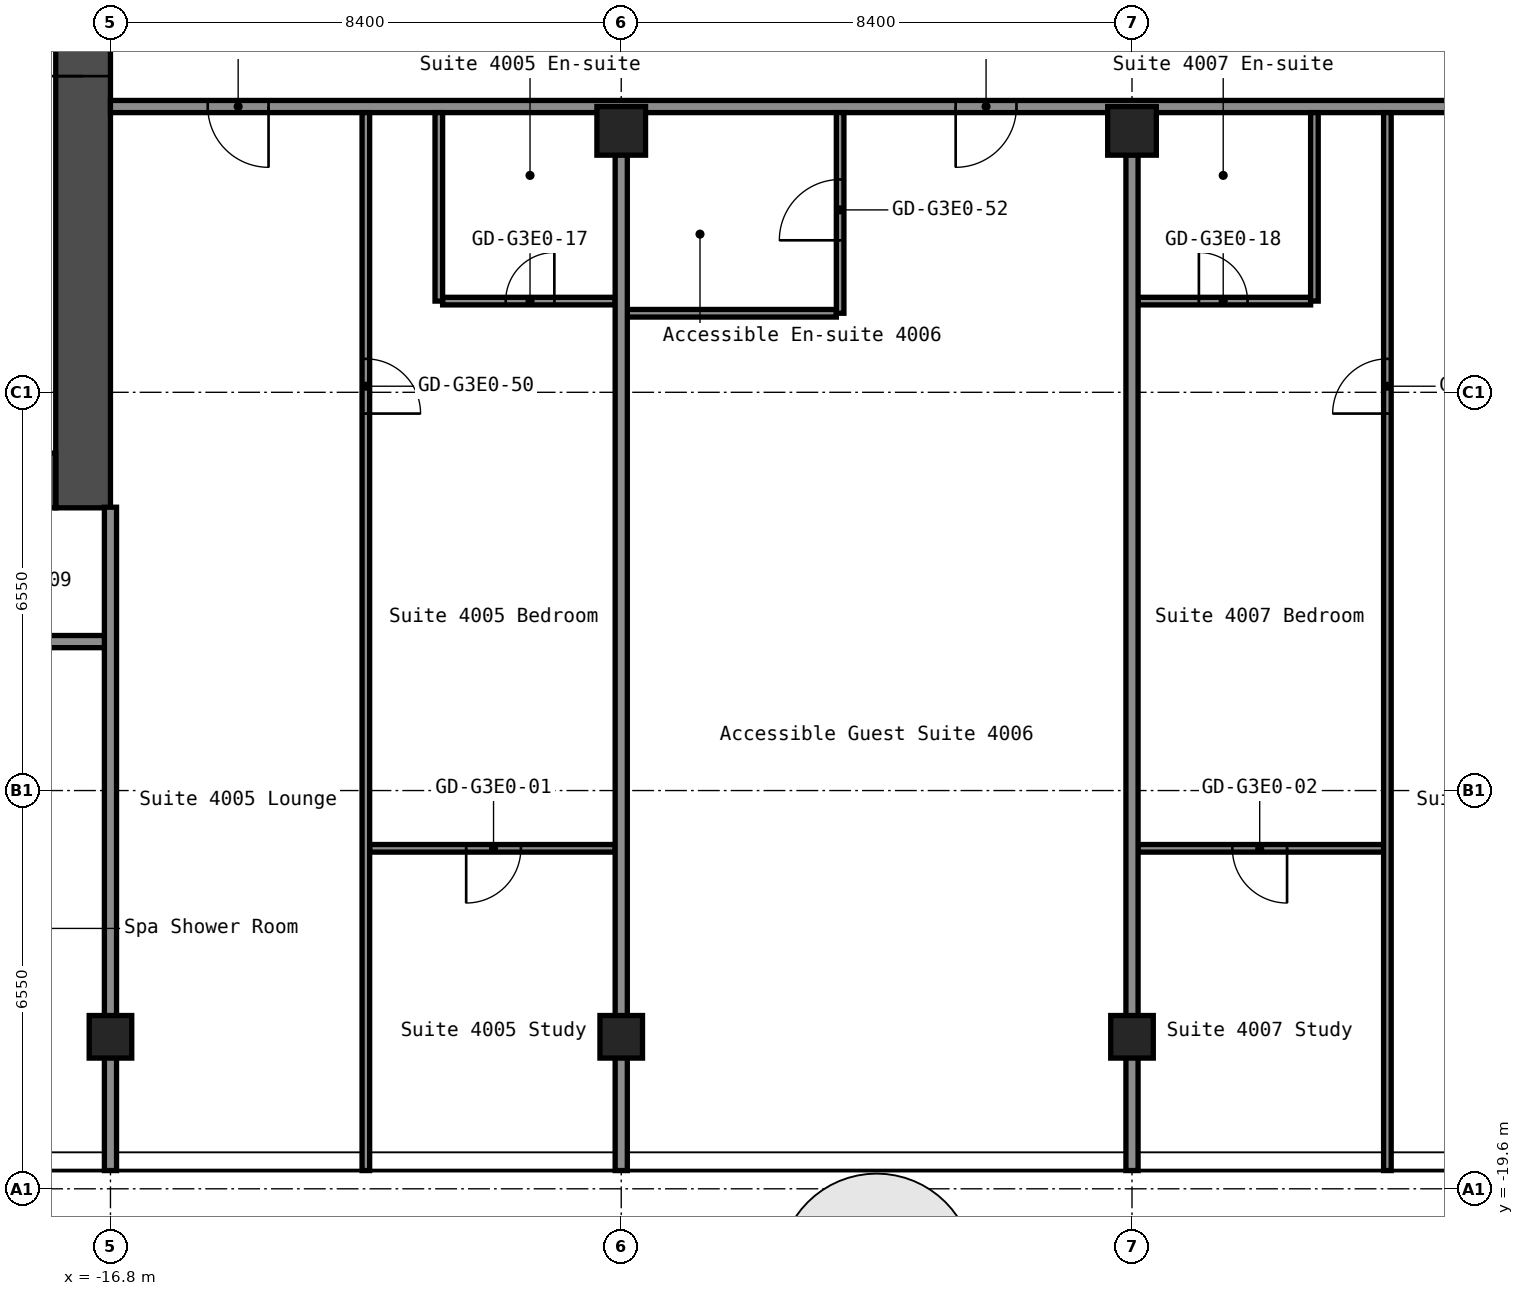
"""IFC4 building model, lengths in metres.
Left out: names, types, materials, properties, quantities, classifications, styles, units other than length and angle.
Written with IfcOpenShell. Run it as: python <this file> out.ifc"""

import sys

from ifc_helpers import new_model, si_unit, direction, frame, frame_2d, origin, origin_2d, place, context, subcontext, project, spatial, rectangle, hollow_rectangle, extrude, element, fill, save


model = new_model("IFC4")
c1 = context("Model", 3, precision=1e-05, world=origin(), true_north=direction((0.0, 1.0)))
c2 = subcontext(c1, "Body", "Model", "MODEL_VIEW")
j1 = project(units=[si_unit("LENGTHUNIT", "METRE"), si_unit("PLANEANGLEUNIT", "RADIAN")], contexts=[c1])
p1 = place(None, origin())
s1 = spatial("IfcSite", under=j1, at=p1, CompositionType="ELEMENT")
p2 = place(p1, origin())
s2 = spatial("IfcBuilding", under=s1, at=p2, CompositionType="ELEMENT")
p3 = place(p2, frame((0.0, 0.0, 143.8)))
s3 = spatial("IfcBuildingStorey", under=s2, at=p3, CompositionType="ELEMENT", Elevation=143.8)
for number, where, z_axis, x_axis in (
    (1, (-16.8, -17.1, 0.0), (0.0, 0.0, 1.0), (1.0, 0.0, 0.0)),
    (2, (-8.4, -17.1, 0.0), (0.0, 0.0, 1.0), (1.0, 0.0, 0.0)),
):
    element("IfcColumn", number, at=place(p3, frame(where, z_axis=z_axis, x_axis=x_axis)), inside=s3, PredefinedType="COLUMN", context=c2, shape_type="SweptSolid", body=[
        extrude(hollow_rectangle(XDim=0.7, YDim=0.7, WallThickness=0.028, at=origin_2d()), origin(), (0.0, 0.0, 1.0), 2.75),
    ])
p4 = place(p3, frame((-8.4, -2.2, 0.0), z_axis=(0.0, 0.0, 1.0), x_axis=(1.0, 0.0, 0.0)))
e3 = element("IfcColumn", 3, at=p4, inside=s3, PredefinedType="COLUMN", context=c2, shape_type="SweptSolid", body=[
    extrude(hollow_rectangle(XDim=0.8, YDim=0.8, WallThickness=0.032, at=origin_2d()), origin(), (0.0, 0.0, 1.0), 2.75),
])
p5 = place(p3, frame((0.0, -17.1, 0.0), z_axis=(0.0, 0.0, 1.0), x_axis=(1.0, 0.0, 0.0)))
e4 = element("IfcColumn", 4, at=p5, inside=s3, PredefinedType="COLUMN", context=c2, shape_type="SweptSolid", body=[
    extrude(hollow_rectangle(XDim=0.7, YDim=0.7, WallThickness=0.028, at=origin_2d()), origin(), (0.0, 0.0, 1.0), 2.75),
])
p6 = place(p3, frame((0.0, -2.2, 0.0), z_axis=(0.0, 0.0, 1.0), x_axis=(1.0, 0.0, 0.0)))
e5 = element("IfcColumn", 5, at=p6, inside=s3, PredefinedType="COLUMN", context=c2, shape_type="SweptSolid", body=[
    extrude(hollow_rectangle(XDim=0.8, YDim=0.8, WallThickness=0.032, at=origin_2d()), origin(), (0.0, 0.0, 1.0), 2.75),
])
p7 = place(p3, frame((-17.25, -8.4, 0.0), z_axis=(0.0, 0.0, 1.0), x_axis=(0.0, 1.0, 0.0)))
e6 = element("IfcWall", 6, at=p7, inside=s3, PredefinedType="SHEAR", context=c2, shape_type="SweptSolid", body=[
    extrude(rectangle(XDim=16.8, YDim=0.9, at=frame_2d((8.4, 0.0))), origin(), (0.0, 0.0, 1.0), 2.75),
])
p8 = place(p7, frame((7.1, 0.0, 0.0)))
e7 = element("IfcOpeningElement", 7, at=p8, cuts=e6, PredefinedType="OPENING", context=c2, shape_type="SweptSolid", body=[
    extrude(rectangle(XDim=1.6, YDim=2.1, at=frame_2d((0.8, 1.05))), frame((0.0, 0.46, 0.0), z_axis=(0.0, -1.0, 0.0), x_axis=(1.0, 0.0, 0.0)), (0.0, 0.0, 1.0), 0.92),
])
p9 = place(p3, frame((-32.7, -7.95, 0.0), z_axis=(0.0, 0.0, 1.0), x_axis=(1.0, 0.0, 0.0)))
e8 = element("IfcWall", 8, at=p9, inside=s3, PredefinedType="SHEAR", context=c2, shape_type="SweptSolid", body=[
    extrude(rectangle(XDim=15.0, YDim=0.9, at=frame_2d((7.5, 0.0))), origin(), (0.0, 0.0, 1.0), 2.75),
])
p10 = place(p9, frame((11.45, 0.0, 0.0)))
e9 = element("IfcOpeningElement", 9, at=p10, cuts=e8, PredefinedType="OPENING", context=c2, shape_type="SweptSolid", body=[
    extrude(rectangle(XDim=1.0, YDim=2.1, at=frame_2d((0.5, 1.05))), frame((0.0, 0.46, 0.0), z_axis=(0.0, -1.0, 0.0), x_axis=(1.0, 0.0, 0.0)), (0.0, 0.0, 1.0), 0.92),
])
p11 = place(p3, frame((-12.538, -14.0, 0.0), z_axis=(0.0, 0.0, 1.0), x_axis=(1.0, 0.0, 0.0)))
e10 = element("IfcWall", 10, at=p11, inside=s3, PredefinedType="PARTITIONING", context=c2, shape_type="SweptSolid", body=[
    extrude(rectangle(XDim=4.038, YDim=0.125, at=frame_2d((2.019, 0.0))), origin(), (0.0, 0.0, 1.0), 2.75),
])
p12 = place(p11, frame((1.587, 0.0, 0.0)))
e11 = element("IfcOpeningElement", 11, at=p12, cuts=e10, PredefinedType="OPENING", context=c2, shape_type="SweptSolid", body=[
    extrude(rectangle(XDim=0.9, YDim=2.1, at=frame_2d((0.45, 1.05))), frame((0.0, 0.073, 0.0), z_axis=(0.0, -1.0, 0.0), x_axis=(1.0, 0.0, 0.0)), (0.0, 0.0, 1.0), 0.145),
])
p13 = place(p3, frame((0.1, -14.0, 0.0), z_axis=(0.0, 0.0, 1.0), x_axis=(1.0, 0.0, 0.0)))
e12 = element("IfcWall", 12, at=p13, inside=s3, PredefinedType="PARTITIONING", context=c2, shape_type="SweptSolid", body=[
    extrude(rectangle(XDim=4.037, YDim=0.125, at=frame_2d((2.019, 0.0))), origin(), (0.0, 0.0, 1.0), 2.75),
])
p14 = place(p13, frame((1.55, 0.0, 0.0)))
e13 = element("IfcOpeningElement", 13, at=p14, cuts=e12, PredefinedType="OPENING", context=c2, shape_type="SweptSolid", body=[
    extrude(rectangle(XDim=0.9, YDim=2.1, at=frame_2d((0.45, 1.05))), frame((0.0, 0.073, 0.0), z_axis=(0.0, -1.0, 0.0), x_axis=(1.0, 0.0, 0.0)), (0.0, 0.0, 1.0), 0.145),
])
p15 = place(p3, frame((-42.7, -10.6, 0.0), z_axis=(0.0, 0.0, 1.0), x_axis=(1.0, 0.0, 0.0)))
e14 = element("IfcWall", 14, at=p15, inside=s3, PredefinedType="PARTITIONING", context=c2, shape_type="SweptSolid", body=[
    extrude(rectangle(XDim=25.9, YDim=0.2, at=frame_2d((12.95, 0.0))), origin(), (0.0, 0.0, 1.0), 2.75),
])
p16 = place(p15, frame((2.225, 0.0, 0.0)))
e15 = element("IfcOpeningElement", 15, at=p16, cuts=e14, PredefinedType="OPENING", context=c2, shape_type="SweptSolid", body=[
    extrude(rectangle(XDim=0.9, YDim=2.1, at=frame_2d((0.45, 1.05))), frame((0.0, 0.11, 0.0), z_axis=(0.0, -1.0, 0.0), x_axis=(1.0, 0.0, 0.0)), (0.0, 0.0, 1.0), 0.22),
])
p17 = place(p15, frame((6.625, 0.0, 0.0)))
e16 = element("IfcOpeningElement", 16, at=p17, cuts=e14, PredefinedType="OPENING", context=c2, shape_type="SweptSolid", body=[
    extrude(rectangle(XDim=0.9, YDim=2.1, at=frame_2d((0.45, 1.05))), frame((0.0, 0.11, 0.0), z_axis=(0.0, -1.0, 0.0), x_axis=(1.0, 0.0, 0.0)), (0.0, 0.0, 1.0), 0.22),
])
p18 = place(p15, frame((11.0, 0.0, 0.0)))
e17 = element("IfcOpeningElement", 17, at=p18, cuts=e14, PredefinedType="OPENING", context=c2, shape_type="SweptSolid", body=[
    extrude(rectangle(XDim=0.9, YDim=2.1, at=frame_2d((0.45, 1.05))), frame((0.0, 0.11, 0.0), z_axis=(0.0, -1.0, 0.0), x_axis=(1.0, 0.0, 0.0)), (0.0, 0.0, 1.0), 0.22),
])
p19 = place(p15, frame((15.2, 0.0, 0.0)))
e18 = element("IfcOpeningElement", 18, at=p19, cuts=e14, PredefinedType="OPENING", context=c2, shape_type="SweptSolid", body=[
    extrude(rectangle(XDim=0.9, YDim=2.1, at=frame_2d((0.45, 1.05))), frame((0.0, 0.11, 0.0), z_axis=(0.0, -1.0, 0.0), x_axis=(1.0, 0.0, 0.0)), (0.0, 0.0, 1.0), 0.22),
])
p20 = place(p15, frame((19.655, 0.0, 0.0)))
e19 = element("IfcOpeningElement", 19, at=p20, cuts=e14, PredefinedType="OPENING", context=c2, shape_type="SweptSolid", body=[
    extrude(rectangle(XDim=0.9, YDim=2.1, at=frame_2d((0.45, 1.05))), frame((0.0, 0.11, 0.0), z_axis=(0.0, -1.0, 0.0), x_axis=(1.0, 0.0, 0.0)), (0.0, 0.0, 1.0), 0.22),
])
p21 = place(p15, frame((23.855, 0.0, 0.0)))
e20 = element("IfcOpeningElement", 20, at=p21, cuts=e14, PredefinedType="OPENING", context=c2, shape_type="SweptSolid", body=[
    extrude(rectangle(XDim=0.9, YDim=2.1, at=frame_2d((0.45, 1.05))), frame((0.0, 0.11, 0.0), z_axis=(0.0, -1.0, 0.0), x_axis=(1.0, 0.0, 0.0)), (0.0, 0.0, 1.0), 0.22),
])
p22 = place(p3, frame((-8.3, -5.2, 0.0), z_axis=(0.0, 0.0, 1.0), x_axis=(1.0, 0.0, 0.0)))
e21 = element("IfcWall", 21, at=p22, inside=s3, PredefinedType="PARTITIONING", context=c2, shape_type="SweptSolid", body=[
    extrude(rectangle(XDim=3.438, YDim=0.125, at=frame_2d((1.719, 0.0))), origin(), (0.0, 0.0, 1.0), 2.75),
])
p23 = place(p3, frame((-11.337, -5.0, 0.0), z_axis=(0.0, 0.0, 1.0), x_axis=(1.0, 0.0, 0.0)))
e22 = element("IfcWall", 22, at=p23, inside=s3, PredefinedType="PARTITIONING", context=c2, shape_type="SweptSolid", body=[
    extrude(rectangle(XDim=2.837, YDim=0.125, at=frame_2d((1.419, 0.0))), origin(), (0.0, 0.0, 1.0), 2.75),
])
p24 = place(p23, frame((1.038, 0.0, 0.0)))
e23 = element("IfcOpeningElement", 23, at=p24, cuts=e22, PredefinedType="OPENING", context=c2, shape_type="SweptSolid", body=[
    extrude(rectangle(XDim=0.8, YDim=2.1, at=frame_2d((0.4, 1.05))), frame((0.0, 0.073, 0.0), z_axis=(0.0, -1.0, 0.0), x_axis=(1.0, 0.0, 0.0)), (0.0, 0.0, 1.0), 0.145),
])
p25 = place(p3, frame((0.1, -5.0, 0.0), z_axis=(0.0, 0.0, 1.0), x_axis=(1.0, 0.0, 0.0)))
e24 = element("IfcWall", 24, at=p25, inside=s3, PredefinedType="PARTITIONING", context=c2, shape_type="SweptSolid", body=[
    extrude(rectangle(XDim=2.837, YDim=0.125, at=frame_2d((1.419, 0.0))), origin(), (0.0, 0.0, 1.0), 2.75),
])
p26 = place(p25, frame((1.0, 0.0, 0.0)))
e25 = element("IfcOpeningElement", 25, at=p26, cuts=e24, PredefinedType="OPENING", context=c2, shape_type="SweptSolid", body=[
    extrude(rectangle(XDim=0.8, YDim=2.1, at=frame_2d((0.4, 1.05))), frame((0.0, 0.073, 0.0), z_axis=(0.0, -1.0, 0.0), x_axis=(1.0, 0.0, 0.0)), (0.0, 0.0, 1.0), 0.145),
])
p27 = place(p3, frame((-16.8, -1.8, 0.0), z_axis=(0.0, 0.0, 1.0), x_axis=(1.0, 0.0, 0.0)))
e26 = element("IfcWall", 26, at=p27, inside=s3, PredefinedType="PARTITIONING", context=c2, shape_type="SweptSolid", body=[
    extrude(rectangle(XDim=33.6, YDim=0.2, at=frame_2d((16.8, 0.0))), origin(), (0.0, 0.0, 1.0), 2.75),
])
p28 = place(p27, frame((1.6, 0.0, 0.0)))
e27 = element("IfcOpeningElement", 27, at=p28, cuts=e26, PredefinedType="OPENING", context=c2, shape_type="SweptSolid", body=[
    extrude(rectangle(XDim=1.0, YDim=2.1, at=frame_2d((0.5, 1.05))), frame((0.0, 0.11, 0.0), z_axis=(0.0, -1.0, 0.0), x_axis=(1.0, 0.0, 0.0)), (0.0, 0.0, 1.0), 0.22),
])
p29 = place(p27, frame((13.9, 0.0, 0.0)))
e28 = element("IfcOpeningElement", 28, at=p29, cuts=e26, PredefinedType="OPENING", context=c2, shape_type="SweptSolid", body=[
    extrude(rectangle(XDim=1.0, YDim=2.1, at=frame_2d((0.5, 1.05))), frame((0.0, 0.11, 0.0), z_axis=(0.0, -1.0, 0.0), x_axis=(1.0, 0.0, 0.0)), (0.0, 0.0, 1.0), 0.22),
])
p30 = place(p27, frame((22.6, 0.0, 0.0)))
e29 = element("IfcOpeningElement", 29, at=p30, cuts=e26, PredefinedType="OPENING", context=c2, shape_type="SweptSolid", body=[
    extrude(rectangle(XDim=1.0, YDim=2.1, at=frame_2d((0.5, 1.05))), frame((0.0, 0.11, 0.0), z_axis=(0.0, -1.0, 0.0), x_axis=(1.0, 0.0, 0.0)), (0.0, 0.0, 1.0), 0.22),
])
p31 = place(p27, frame((26.8, 0.0, 0.0)))
e30 = element("IfcOpeningElement", 30, at=p31, cuts=e26, PredefinedType="OPENING", context=c2, shape_type="SweptSolid", body=[
    extrude(rectangle(XDim=1.0, YDim=2.1, at=frame_2d((0.5, 1.05))), frame((0.0, 0.11, 0.0), z_axis=(0.0, -1.0, 0.0), x_axis=(1.0, 0.0, 0.0)), (0.0, 0.0, 1.0), 0.22),
])
p32 = place(p3, frame((-16.8, -19.3, 0.0), z_axis=(0.0, 0.0, 1.0), x_axis=(0.0, 1.0, 0.0)))
e31 = element("IfcWall", 31, at=p32, inside=s3, PredefinedType="PARTITIONING", context=c2, shape_type="SweptSolid", body=[
    extrude(rectangle(XDim=10.91, YDim=0.2, at=frame_2d((5.455, 0.0))), origin(), (0.0, 0.0, 1.0), 2.75),
])
p33 = place(p3, frame((-12.6, -19.3, 0.0), z_axis=(0.0, 0.0, 1.0), x_axis=(0.0, 1.0, 0.0)))
e32 = element("IfcWall", 32, at=p33, inside=s3, PredefinedType="PARTITIONING", context=c2, shape_type="SweptSolid", body=[
    extrude(rectangle(XDim=17.4, YDim=0.125, at=frame_2d((8.7, 0.0))), origin(), (0.0, 0.0, 1.0), 2.75),
])
p34 = place(p33, frame((12.45, 0.0, 0.0)))
e33 = element("IfcOpeningElement", 33, at=p34, cuts=e32, PredefinedType="OPENING", context=c2, shape_type="SweptSolid", body=[
    extrude(rectangle(XDim=0.9, YDim=2.1, at=frame_2d((0.45, 1.05))), frame((0.0, 0.073, 0.0), z_axis=(0.0, -1.0, 0.0), x_axis=(1.0, 0.0, 0.0)), (0.0, 0.0, 1.0), 0.145),
])
p35 = place(p3, frame((-11.4, -5.0, 0.0), z_axis=(0.0, 0.0, 1.0), x_axis=(0.0, 1.0, 0.0)))
e34 = element("IfcWall", 34, at=p35, inside=s3, PredefinedType="PARTITIONING", context=c2, shape_type="SweptSolid", body=[
    extrude(rectangle(XDim=3.1, YDim=0.125, at=frame_2d((1.55, 0.0))), origin(), (0.0, 0.0, 1.0), 2.75),
])
p36 = place(p3, frame((-8.4, -19.3, 0.0), z_axis=(0.0, 0.0, 1.0), x_axis=(0.0, 1.0, 0.0)))
e35 = element("IfcWall", 35, at=p36, inside=s3, PredefinedType="PARTITIONING", context=c2, shape_type="SweptSolid", body=[
    extrude(rectangle(XDim=16.71, YDim=0.2, at=frame_2d((8.355, 0.0))), origin(), (0.0, 0.0, 1.0), 2.75),
])
p37 = place(p3, frame((-4.8, -5.2, 0.0), z_axis=(0.0, 0.0, 1.0), x_axis=(0.0, 1.0, 0.0)))
e36 = element("IfcWall", 36, at=p37, inside=s3, PredefinedType="PARTITIONING", context=c2, shape_type="SweptSolid", body=[
    extrude(rectangle(XDim=3.3, YDim=0.125, at=frame_2d((1.65, 0.0))), origin(), (0.0, 0.0, 1.0), 2.75),
])
p38 = place(p37, frame((1.2, 0.0, 0.0)))
e37 = element("IfcOpeningElement", 37, at=p38, cuts=e36, PredefinedType="OPENING", context=c2, shape_type="SweptSolid", body=[
    extrude(rectangle(XDim=1.0, YDim=2.1, at=frame_2d((0.5, 1.05))), frame((0.0, 0.073, 0.0), z_axis=(0.0, -1.0, 0.0), x_axis=(1.0, 0.0, 0.0)), (0.0, 0.0, 1.0), 0.145),
])
p39 = place(p3, frame((0.0, -19.3, 0.0), z_axis=(0.0, 0.0, 1.0), x_axis=(0.0, 1.0, 0.0)))
e38 = element("IfcWall", 38, at=p39, inside=s3, PredefinedType="PARTITIONING", context=c2, shape_type="SweptSolid", body=[
    extrude(rectangle(XDim=16.71, YDim=0.2, at=frame_2d((8.355, 0.0))), origin(), (0.0, 0.0, 1.0), 2.75),
])
p40 = place(p3, frame((3.0, -5.0, 0.0), z_axis=(0.0, 0.0, 1.0), x_axis=(0.0, 1.0, 0.0)))
e39 = element("IfcWall", 39, at=p40, inside=s3, PredefinedType="PARTITIONING", context=c2, shape_type="SweptSolid", body=[
    extrude(rectangle(XDim=3.1, YDim=0.125, at=frame_2d((1.55, 0.0))), origin(), (0.0, 0.0, 1.0), 2.75),
])
p41 = place(p3, frame((4.2, -19.3, 0.0), z_axis=(0.0, 0.0, 1.0), x_axis=(0.0, 1.0, 0.0)))
e40 = element("IfcWall", 40, at=p41, inside=s3, PredefinedType="PARTITIONING", context=c2, shape_type="SweptSolid", body=[
    extrude(rectangle(XDim=17.4, YDim=0.125, at=frame_2d((8.7, 0.0))), origin(), (0.0, 0.0, 1.0), 2.75),
])
p42 = place(p41, frame((12.45, 0.0, 0.0)))
e41 = element("IfcOpeningElement", 41, at=p42, cuts=e40, PredefinedType="OPENING", context=c2, shape_type="SweptSolid", body=[
    extrude(rectangle(XDim=0.9, YDim=2.1, at=frame_2d((0.45, 1.05))), frame((0.0, 0.073, 0.0), z_axis=(0.0, -1.0, 0.0), x_axis=(1.0, 0.0, 0.0)), (0.0, 0.0, 1.0), 0.145),
])
p43 = place(p8, origin())
e42 = element("IfcDoor", 42, at=p43, inside=s3, OperationType="DOUBLE_DOOR_SINGLE_SWING", PredefinedType="DOOR", context=c2, shape_type="SweptSolid", body=[
    extrude(rectangle(XDim=1.6, YDim=2.1, at=frame_2d((0.8, 1.05))), frame((0.0, 0.025, 0.0), z_axis=(0.0, -1.0, 0.0), x_axis=(1.0, 0.0, 0.0)), (0.0, 0.0, 1.0), 0.05),
])
fill(e7, e42)
p44 = place(p12, origin())
e43 = element("IfcDoor", 43, at=p44, inside=s3, OperationType="SINGLE_SWING_LEFT", PredefinedType="DOOR", context=c2, shape_type="SweptSolid", body=[
    extrude(rectangle(XDim=0.9, YDim=2.1, at=frame_2d((0.45, 1.05))), frame((0.0, 0.025, 0.0), z_axis=(0.0, -1.0, 0.0), x_axis=(1.0, 0.0, 0.0)), (0.0, 0.0, 1.0), 0.05),
])
fill(e11, e43)
p45 = place(p14, origin())
e44 = element("IfcDoor", 44, at=p45, inside=s3, OperationType="SINGLE_SWING_RIGHT", PredefinedType="DOOR", context=c2, shape_type="SweptSolid", body=[
    extrude(rectangle(XDim=0.9, YDim=2.1, at=frame_2d((0.45, 1.05))), frame((0.0, 0.025, 0.0), z_axis=(0.0, -1.0, 0.0), x_axis=(1.0, 0.0, 0.0)), (0.0, 0.0, 1.0), 0.05),
])
fill(e13, e44)
p46 = place(p24, origin())
e45 = element("IfcDoor", 45, at=p46, inside=s3, OperationType="SINGLE_SWING_LEFT", PredefinedType="DOOR", context=c2, shape_type="SweptSolid", body=[
    extrude(rectangle(XDim=0.8, YDim=2.1, at=frame_2d((0.4, 1.05))), frame((0.0, 0.025, 0.0), z_axis=(0.0, -1.0, 0.0), x_axis=(1.0, 0.0, 0.0)), (0.0, 0.0, 1.0), 0.05),
])
fill(e23, e45)
p47 = place(p26, origin())
e46 = element("IfcDoor", 46, at=p47, inside=s3, OperationType="SINGLE_SWING_RIGHT", PredefinedType="DOOR", context=c2, shape_type="SweptSolid", body=[
    extrude(rectangle(XDim=0.8, YDim=2.1, at=frame_2d((0.4, 1.05))), frame((0.0, 0.025, 0.0), z_axis=(0.0, -1.0, 0.0), x_axis=(1.0, 0.0, 0.0)), (0.0, 0.0, 1.0), 0.05),
])
fill(e25, e46)
p48 = place(p28, origin())
e47 = element("IfcDoor", 47, at=p48, inside=s3, OperationType="SINGLE_SWING_RIGHT", PredefinedType="DOOR", context=c2, shape_type="SweptSolid", body=[
    extrude(rectangle(XDim=1.0, YDim=2.1, at=frame_2d((0.5, 1.05))), frame((0.0, 0.025, 0.0), z_axis=(0.0, -1.0, 0.0), x_axis=(1.0, 0.0, 0.0)), (0.0, 0.0, 1.0), 0.05),
])
fill(e27, e47)
p49 = place(p29, origin())
e48 = element("IfcDoor", 48, at=p49, inside=s3, OperationType="SINGLE_SWING_LEFT", PredefinedType="DOOR", context=c2, shape_type="SweptSolid", body=[
    extrude(rectangle(XDim=1.0, YDim=2.1, at=frame_2d((0.5, 1.05))), frame((0.0, 0.025, 0.0), z_axis=(0.0, -1.0, 0.0), x_axis=(1.0, 0.0, 0.0)), (0.0, 0.0, 1.0), 0.05),
])
fill(e28, e48)
p50 = place(p34, origin())
e49 = element("IfcDoor", 49, at=p50, inside=s3, OperationType="SINGLE_SWING_LEFT", PredefinedType="DOOR", context=c2, shape_type="SweptSolid", body=[
    extrude(rectangle(XDim=0.9, YDim=2.1, at=frame_2d((0.45, 1.05))), frame((0.0, 0.025, 0.0), z_axis=(0.0, -1.0, 0.0), x_axis=(1.0, 0.0, 0.0)), (0.0, 0.0, 1.0), 0.05),
])
fill(e33, e49)
p51 = place(p38, origin())
e50 = element("IfcDoor", 50, at=p51, inside=s3, OperationType="SINGLE_SWING_RIGHT", PredefinedType="DOOR", context=c2, shape_type="SweptSolid", body=[
    extrude(rectangle(XDim=1.0, YDim=2.1, at=frame_2d((0.5, 1.05))), frame((0.0, 0.025, 0.0), z_axis=(0.0, -1.0, 0.0), x_axis=(1.0, 0.0, 0.0)), (0.0, 0.0, 1.0), 0.05),
])
fill(e37, e50)
p52 = place(p42, origin())
e51 = element("IfcDoor", 51, at=p52, inside=s3, OperationType="SINGLE_SWING_RIGHT", PredefinedType="DOOR", context=c2, shape_type="SweptSolid", body=[
    extrude(rectangle(XDim=0.9, YDim=2.1, at=frame_2d((0.45, 1.05))), frame((0.0, 0.025, 0.0), z_axis=(0.0, -1.0, 0.0), x_axis=(1.0, 0.0, 0.0)), (0.0, 0.0, 1.0), 0.05),
])
fill(e41, e51)
save(model, sys.argv[1])
